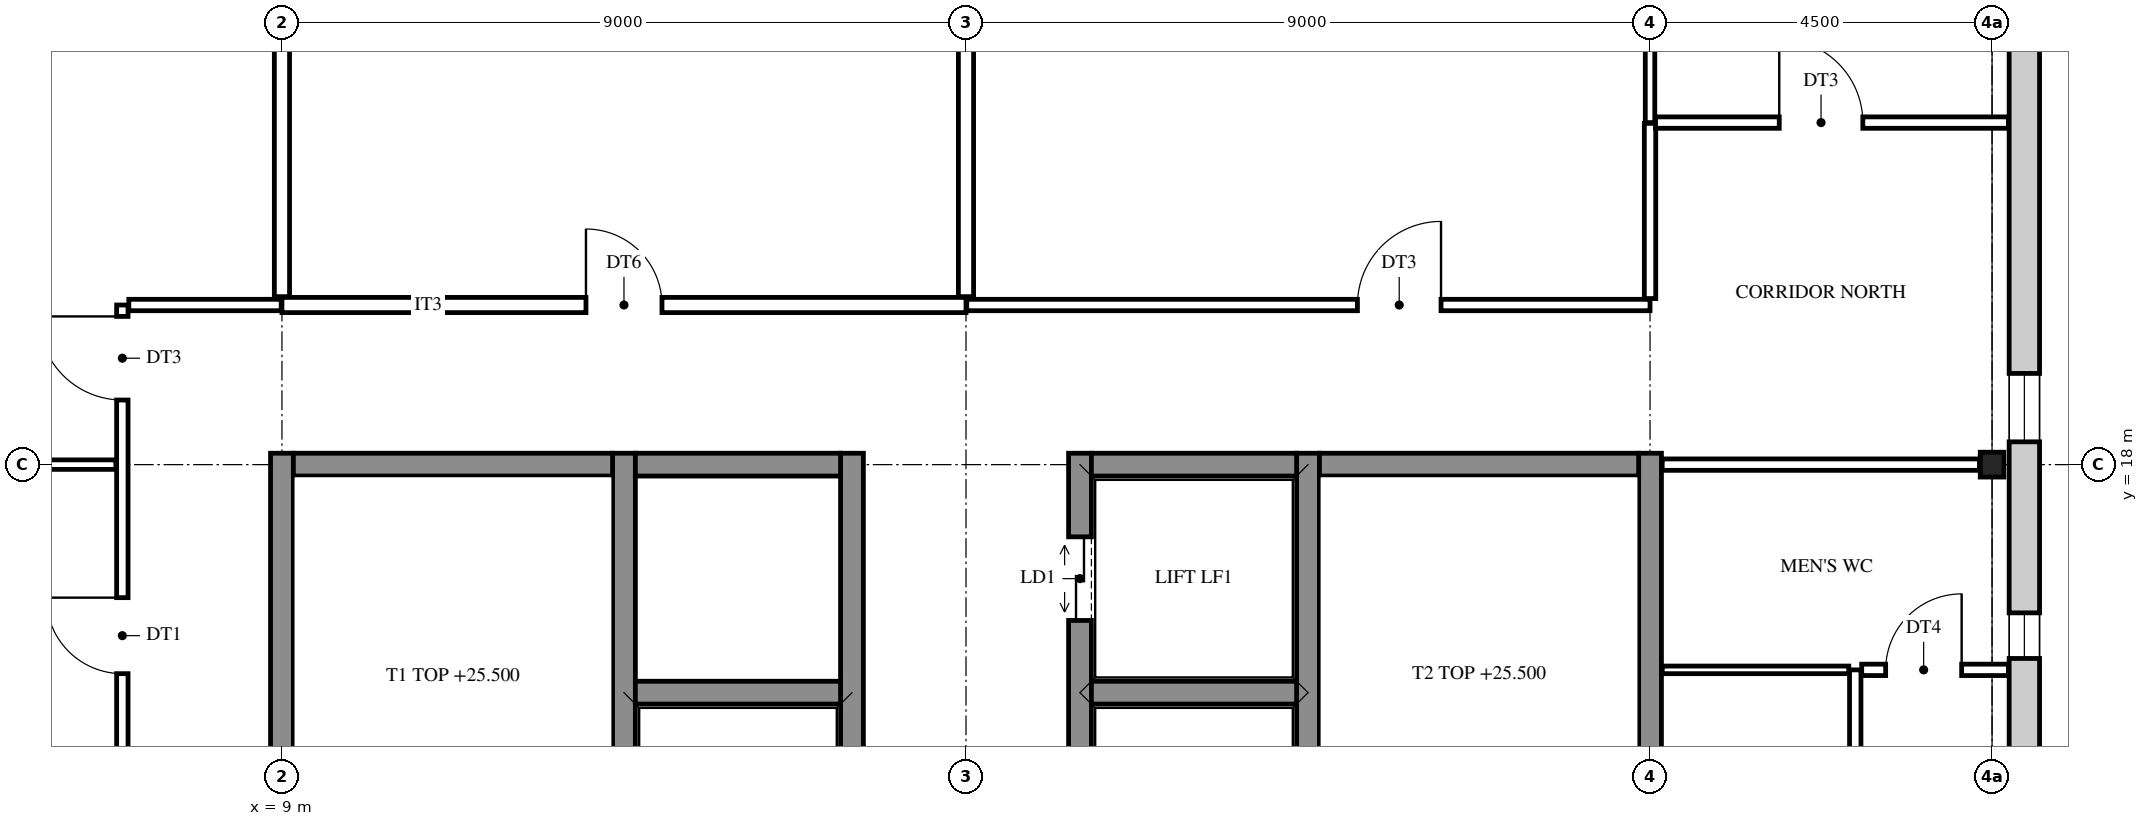
"""IFC4 building model, lengths in metres.
Left out: names, types, materials, properties, quantities, classifications, styles, units other than length and angle.
Written with IfcOpenShell. Run it as: python <this file> out.ifc"""

import sys

from ifc_helpers import new_model, si_unit, direction, frame, frame_2d, origin, origin_2d, place, context, subcontext, project, spatial, rectangle, i_section, extrude, element, fill, save


model = new_model("IFC4")
c1 = context("Model", 3, precision=1e-05, world=origin(), true_north=direction((0.0, 1.0)))
c2 = subcontext(c1, "Body", "Model", "MODEL_VIEW")
j1 = project(units=[si_unit("LENGTHUNIT", "METRE"), si_unit("PLANEANGLEUNIT", "RADIAN")], contexts=[c1])
p1 = place(None, origin())
s1 = spatial("IfcSite", under=j1, at=p1, CompositionType="ELEMENT")
p2 = place(p1, origin())
s2 = spatial("IfcBuilding", under=s1, at=p2, CompositionType="ELEMENT")
p3 = place(p2, frame((0.0, 0.0, 23.4)))
s3 = spatial("IfcBuildingStorey", under=s2, at=p3, CompositionType="ELEMENT", Elevation=23.4)
p4 = place(p3, frame((31.5, 18.0, 0.0), z_axis=(0.0, 0.0, 1.0), x_axis=(1.0, 0.0, 0.0)))
e1 = element("IfcColumn", 1, at=p4, inside=s3, PredefinedType="COLUMN", context=c2, shape_type="SweptSolid", body=[
    extrude(i_section(OverallWidth=0.311, OverallDepth=0.327, WebThickness=0.016, FlangeThickness=0.025, FilletRadius=0.017, at=origin_2d()), origin(), (0.0, 0.0, 1.0), 4.2),
])
for number, where, z_axis, x_axis in (
    (2, (9.0, 8.85, 0.0), (0.0, 0.0, 1.0), (0.0, 1.0, 0.0)),
    (3, (13.5, 8.85, 0.0), (0.0, 0.0, 1.0), (0.0, 1.0, 0.0)),
):
    element("IfcWall", number, at=place(p3, frame(where, z_axis=z_axis, x_axis=x_axis)), inside=s3, PredefinedType="SHEAR", context=c2, shape_type="SweptSolid", body=[
        extrude(rectangle(XDim=9.3, YDim=0.3, at=frame_2d((4.65, 0.0))), origin(), (0.0, 0.0, 1.0), 4.2),
    ])
p5 = place(p3, frame((16.5, 8.85, 0.0), z_axis=(0.0, 0.0, 1.0), x_axis=(0.0, 1.0, 0.0)))
e4 = element("IfcWall", 4, at=p5, inside=s3, PredefinedType="SHEAR", context=c2, shape_type="SweptSolid", body=[
    extrude(rectangle(XDim=9.3, YDim=0.3, at=frame_2d((4.65, 0.0))), origin(), (0.0, 0.0, 1.0), 4.2),
])
p6 = place(p5, frame((1.1, 0.0, 0.0)))
e5 = element("IfcOpeningElement", 5, at=p6, cuts=e4, PredefinedType="OPENING", context=c2, shape_type="SweptSolid", body=[
    extrude(rectangle(XDim=1.1, YDim=2.1, at=frame_2d((0.55, 1.05))), frame((0.0, 0.16, 0.0), z_axis=(0.0, -1.0, 0.0), x_axis=(1.0, 0.0, 0.0)), (0.0, 0.0, 1.0), 0.32),
])
p7 = place(p5, frame((4.1, 0.0, 0.0)))
e6 = element("IfcOpeningElement", 6, at=p7, cuts=e4, PredefinedType="OPENING", context=c2, shape_type="SweptSolid", body=[
    extrude(rectangle(XDim=1.1, YDim=2.1, at=frame_2d((0.55, 1.05))), frame((0.0, 0.16, 0.0), z_axis=(0.0, -1.0, 0.0), x_axis=(1.0, 0.0, 0.0)), (0.0, 0.0, 1.0), 0.32),
])
p8 = place(p3, frame((19.5, 8.85, 0.0), z_axis=(0.0, 0.0, 1.0), x_axis=(0.0, 1.0, 0.0)))
e7 = element("IfcWall", 7, at=p8, inside=s3, PredefinedType="SHEAR", context=c2, shape_type="SweptSolid", body=[
    extrude(rectangle(XDim=9.3, YDim=0.3, at=frame_2d((4.65, 0.0))), origin(), (0.0, 0.0, 1.0), 4.2),
])
p9 = place(p8, frame((3.95, 0.0, 0.0)))
e8 = element("IfcOpeningElement", 8, at=p9, cuts=e7, PredefinedType="OPENING", context=c2, shape_type="SweptSolid", body=[
    extrude(rectangle(XDim=1.4, YDim=2.1, at=frame_2d((0.7, 1.05))), frame((0.0, 0.16, 0.0), z_axis=(0.0, -1.0, 0.0), x_axis=(1.0, 0.0, 0.0)), (0.0, 0.0, 1.0), 0.32),
])
p10 = place(p8, frame((7.1, 0.0, 0.0)))
e9 = element("IfcOpeningElement", 9, at=p10, cuts=e7, PredefinedType="OPENING", context=c2, shape_type="SweptSolid", body=[
    extrude(rectangle(XDim=1.1, YDim=2.1, at=frame_2d((0.55, 1.05))), frame((0.0, 0.16, 0.0), z_axis=(0.0, -1.0, 0.0), x_axis=(1.0, 0.0, 0.0)), (0.0, 0.0, 1.0), 0.32),
])
for number, where, z_axis, x_axis in (
    (10, (22.5, 8.85, 0.0), (0.0, 0.0, 1.0), (0.0, 1.0, 0.0)),
    (11, (27.0, 8.85, 0.0), (0.0, 0.0, 1.0), (0.0, 1.0, 0.0)),
):
    element("IfcWall", number, at=place(p3, frame(where, z_axis=z_axis, x_axis=x_axis)), inside=s3, PredefinedType="SHEAR", context=c2, shape_type="SweptSolid", body=[
        extrude(rectangle(XDim=9.3, YDim=0.3, at=frame_2d((4.65, 0.0))), origin(), (0.0, 0.0, 1.0), 4.2),
    ])
for number, where, z_axis, x_axis in (
    (12, (13.65, 15.0, 0.0), (0.0, 0.0, 1.0), (1.0, 0.0, 0.0)),
    (13, (19.65, 15.0, 0.0), (0.0, 0.0, 1.0), (1.0, 0.0, 0.0)),
):
    element("IfcWall", number, at=place(p3, frame(where, z_axis=z_axis, x_axis=x_axis)), inside=s3, PredefinedType="SHEAR", context=c2, shape_type="SweptSolid", body=[
        extrude(rectangle(XDim=2.7, YDim=0.3, at=frame_2d((1.35, 0.0))), origin(), (0.0, 0.0, 1.0), 4.2),
    ])
p11 = place(p3, frame((9.15, 18.0, 0.0), z_axis=(0.0, 0.0, 1.0), x_axis=(1.0, 0.0, 0.0)))
e14 = element("IfcWall", 14, at=p11, inside=s3, PredefinedType="SHEAR", context=c2, shape_type="SweptSolid", body=[
    extrude(rectangle(XDim=4.2, YDim=0.3, at=frame_2d((2.1, 0.0))), origin(), (0.0, 0.0, 1.0), 4.2),
])
for number, where, z_axis, x_axis in (
    (15, (13.65, 18.0, 0.0), (0.0, 0.0, 1.0), (1.0, 0.0, 0.0)),
    (16, (19.65, 18.0, 0.0), (0.0, 0.0, 1.0), (1.0, 0.0, 0.0)),
):
    element("IfcWall", number, at=place(p3, frame(where, z_axis=z_axis, x_axis=x_axis)), inside=s3, PredefinedType="SHEAR", context=c2, shape_type="SweptSolid", body=[
        extrude(rectangle(XDim=2.7, YDim=0.3, at=frame_2d((1.35, 0.0))), origin(), (0.0, 0.0, 1.0), 4.2),
    ])
p12 = place(p3, frame((22.65, 18.0, 0.0), z_axis=(0.0, 0.0, 1.0), x_axis=(1.0, 0.0, 0.0)))
e17 = element("IfcWall", 17, at=p12, inside=s3, PredefinedType="SHEAR", context=c2, shape_type="SweptSolid", body=[
    extrude(rectangle(XDim=4.2, YDim=0.3, at=frame_2d((2.1, 0.0))), origin(), (0.0, 0.0, 1.0), 4.2),
])
p13 = place(p3, frame((31.925, 27.225, 0.0), z_axis=(0.0, 0.0, 1.0), x_axis=(0.0, -1.0, 0.0)))
e18 = element("IfcWall", 18, at=p13, inside=s3, PredefinedType="STANDARD", context=c2, shape_type="SweptSolid", body=[
    extrude(rectangle(XDim=27.45, YDim=0.4, at=frame_2d((13.725, 0.0))), origin(), (0.0, 0.0, 1.0), 4.2),
])
p14 = place(p13, frame((26.025, 0.0, 0.9)))
e19 = element("IfcOpeningElement", 19, at=p14, cuts=e18, PredefinedType="OPENING", context=c2, shape_type="SweptSolid", body=[
    extrude(rectangle(XDim=0.9, YDim=2.0, at=frame_2d((0.45, 1.0))), frame((0.0, 0.21, 0.0), z_axis=(0.0, -1.0, 0.0), x_axis=(1.0, 0.0, 0.0)), (0.0, 0.0, 1.0), 0.42),
])
p15 = place(p13, frame((18.525, 0.0, 0.9)))
e20 = element("IfcOpeningElement", 20, at=p15, cuts=e18, PredefinedType="OPENING", context=c2, shape_type="SweptSolid", body=[
    extrude(rectangle(XDim=0.9, YDim=2.0, at=frame_2d((0.45, 1.0))), frame((0.0, 0.21, 0.0), z_axis=(0.0, -1.0, 0.0), x_axis=(1.0, 0.0, 0.0)), (0.0, 0.0, 1.0), 0.42),
])
p16 = place(p13, frame((15.675, 0.0, 1.6)))
e21 = element("IfcOpeningElement", 21, at=p16, cuts=e18, PredefinedType="OPENING", context=c2, shape_type="SweptSolid", body=[
    extrude(rectangle(XDim=0.6, YDim=0.9, at=frame_2d((0.3, 0.45))), frame((0.0, 0.21, 0.0), z_axis=(0.0, -1.0, 0.0), x_axis=(1.0, 0.0, 0.0)), (0.0, 0.0, 1.0), 0.42),
])
p17 = place(p13, frame((11.175, 0.0, 1.6)))
e22 = element("IfcOpeningElement", 22, at=p17, cuts=e18, PredefinedType="OPENING", context=c2, shape_type="SweptSolid", body=[
    extrude(rectangle(XDim=0.6, YDim=0.9, at=frame_2d((0.3, 0.45))), frame((0.0, 0.21, 0.0), z_axis=(0.0, -1.0, 0.0), x_axis=(1.0, 0.0, 0.0)), (0.0, 0.0, 1.0), 0.42),
])
p18 = place(p13, frame((8.025, 0.0, 0.9)))
e23 = element("IfcOpeningElement", 23, at=p18, cuts=e18, PredefinedType="OPENING", context=c2, shape_type="SweptSolid", body=[
    extrude(rectangle(XDim=0.9, YDim=2.0, at=frame_2d((0.45, 1.0))), frame((0.0, 0.21, 0.0), z_axis=(0.0, -1.0, 0.0), x_axis=(1.0, 0.0, 0.0)), (0.0, 0.0, 1.0), 0.42),
])
p19 = place(p13, frame((0.525, 0.0, 0.9)))
e24 = element("IfcOpeningElement", 24, at=p19, cuts=e18, PredefinedType="OPENING", context=c2, shape_type="SweptSolid", body=[
    extrude(rectangle(XDim=0.9, YDim=2.0, at=frame_2d((0.45, 1.0))), frame((0.0, 0.21, 0.0), z_axis=(0.0, -1.0, 0.0), x_axis=(1.0, 0.0, 0.0)), (0.0, 0.0, 1.0), 0.42),
])
p20 = place(p3, frame((6.9, 6.985, 0.0), z_axis=(0.0, 0.0, 1.0), x_axis=(0.0, 1.0, 0.0)))
e25 = element("IfcWall", 25, at=p20, inside=s3, PredefinedType="PARTITIONING", context=c2, shape_type="SweptSolid", body=[
    extrude(rectangle(XDim=13.115, YDim=0.15, at=frame_2d((6.558, 0.0))), origin(), (0.0, 0.0, 1.0), 3.537),
])
p21 = place(p20, frame((11.865, 0.0, 0.0)))
e26 = element("IfcOpeningElement", 26, at=p21, cuts=e25, PredefinedType="OPENING", context=c2, shape_type="SweptSolid", body=[
    extrude(rectangle(XDim=1.1, YDim=2.1, at=frame_2d((0.55, 1.05))), frame((0.0, 0.085, 0.0), z_axis=(0.0, -1.0, 0.0), x_axis=(1.0, 0.0, 0.0)), (0.0, 0.0, 1.0), 0.17),
])
p22 = place(p20, frame((3.765, 0.0, 0.0)))
e27 = element("IfcOpeningElement", 27, at=p22, cuts=e25, PredefinedType="OPENING", context=c2, shape_type="SweptSolid", body=[
    extrude(rectangle(XDim=1.0, YDim=2.1, at=frame_2d((0.5, 1.05))), frame((0.0, 0.085, 0.0), z_axis=(0.0, -1.0, 0.0), x_axis=(1.0, 0.0, 0.0)), (0.0, 0.0, 1.0), 0.17),
])
p23 = place(p20, frame((8.265, 0.0, 0.0)))
e28 = element("IfcOpeningElement", 28, at=p23, cuts=e25, PredefinedType="OPENING", context=c2, shape_type="SweptSolid", body=[
    extrude(rectangle(XDim=1.0, YDim=2.1, at=frame_2d((0.5, 1.05))), frame((0.0, 0.085, 0.0), z_axis=(0.0, -1.0, 0.0), x_axis=(1.0, 0.0, 0.0)), (0.0, 0.0, 1.0), 0.17),
])
for number, where, z_axis, x_axis in (
    (29, (9.0, 20.21, 0.0), (0.0, 0.0, 1.0), (0.0, 1.0, 0.0)),
    (30, (18.0, 20.21, 0.0), (0.0, 0.0, 1.0), (0.0, 1.0, 0.0)),
):
    element("IfcWall", number, at=place(p3, frame(where, z_axis=z_axis, x_axis=x_axis)), inside=s3, PredefinedType="PARTITIONING", context=c2, shape_type="SweptSolid", body=[
        extrude(rectangle(XDim=6.616, YDim=0.2, at=frame_2d((3.308, 0.0))), origin(), (0.0, 0.0, 1.0), 3.537),
    ])
p24 = place(p3, frame((27.0, 20.185, 0.0), z_axis=(0.0, 0.0, 1.0), x_axis=(0.0, 1.0, 0.0)))
e31 = element("IfcWall", 31, at=p24, inside=s3, PredefinedType="PARTITIONING", context=c2, shape_type="SweptSolid", body=[
    extrude(rectangle(XDim=2.305, YDim=0.15, at=frame_2d((1.152, 0.0))), origin(), (0.0, 0.0, 1.0), 3.537),
])
p25 = place(p3, frame((27.0, 22.5, 0.0), z_axis=(0.0, 0.0, 1.0), x_axis=(0.0, 1.0, 0.0)))
e32 = element("IfcWall", 32, at=p25, inside=s3, PredefinedType="PARTITIONING", context=c2, shape_type="SweptSolid", body=[
    extrude(rectangle(XDim=4.326, YDim=0.125, at=frame_2d((2.163, 0.0))), origin(), (0.0, 0.0, 1.0), 3.537),
])
p26 = place(p3, frame((29.7, 9.0, 0.0), z_axis=(0.0, 0.0, 1.0), x_axis=(0.0, 1.0, 0.0)))
e33 = element("IfcWall", 33, at=p26, inside=s3, PredefinedType="PARTITIONING", context=c2, shape_type="SweptSolid", body=[
    extrude(rectangle(XDim=6.3, YDim=0.15, at=frame_2d((3.15, 0.0))), origin(), (0.0, 0.0, 1.0), 3.537),
])
p27 = place(p26, frame((4.0, 0.0, 0.0)))
e34 = element("IfcOpeningElement", 34, at=p27, cuts=e33, PredefinedType="OPENING", context=c2, shape_type="SweptSolid", body=[
    extrude(rectangle(XDim=1.0, YDim=2.1, at=frame_2d((0.5, 1.05))), frame((0.0, 0.085, 0.0), z_axis=(0.0, -1.0, 0.0), x_axis=(1.0, 0.0, 0.0)), (0.0, 0.0, 1.0), 0.17),
])
p28 = place(p3, frame((27.16, 15.3, 0.0), z_axis=(0.0, 0.0, 1.0), x_axis=(1.0, 0.0, 0.0)))
e35 = element("IfcWall", 35, at=p28, inside=s3, PredefinedType="PARTITIONING", context=c2, shape_type="SweptSolid", body=[
    extrude(rectangle(XDim=2.455, YDim=0.1, at=frame_2d((1.228, 0.0))), origin(), (0.0, 0.0, 1.0), 3.537),
])
p29 = place(p3, frame((29.785, 15.3, 0.0), z_axis=(0.0, 0.0, 1.0), x_axis=(1.0, 0.0, 0.0)))
e36 = element("IfcWall", 36, at=p29, inside=s3, PredefinedType="PARTITIONING", context=c2, shape_type="SweptSolid", body=[
    extrude(rectangle(XDim=1.93, YDim=0.15, at=frame_2d((0.965, 0.0))), origin(), (0.0, 0.0, 1.0), 3.537),
])
p30 = place(p29, frame((0.315, 0.0, 0.0)))
e37 = element("IfcOpeningElement", 37, at=p30, cuts=e36, PredefinedType="OPENING", context=c2, shape_type="SweptSolid", body=[
    extrude(rectangle(XDim=1.0, YDim=2.1, at=frame_2d((0.5, 1.05))), frame((0.0, 0.085, 0.0), z_axis=(0.0, -1.0, 0.0), x_axis=(1.0, 0.0, 0.0)), (0.0, 0.0, 1.0), 0.17),
])
p31 = place(p3, frame((0.166, 18.0, 0.0), z_axis=(0.0, 0.0, 1.0), x_axis=(1.0, 0.0, 0.0)))
e38 = element("IfcWall", 38, at=p31, inside=s3, PredefinedType="PARTITIONING", context=c2, shape_type="SweptSolid", body=[
    extrude(rectangle(XDim=6.649, YDim=0.125, at=frame_2d((3.325, 0.0))), origin(), (0.0, 0.0, 1.0), 3.537),
])
p32 = place(p3, frame((27.16, 18.0, 0.0), z_axis=(0.0, 0.0, 1.0), x_axis=(1.0, 0.0, 0.0)))
e39 = element("IfcWall", 39, at=p32, inside=s3, PredefinedType="PARTITIONING", context=c2, shape_type="SweptSolid", body=[
    extrude(rectangle(XDim=4.175, YDim=0.15, at=frame_2d((2.087, 0.0))), origin(), (0.0, 0.0, 1.0), 3.537),
])
p33 = place(p3, frame((6.985, 20.1, 0.0), z_axis=(0.0, 0.0, 1.0), x_axis=(1.0, 0.0, 0.0)))
e40 = element("IfcWall", 40, at=p33, inside=s3, PredefinedType="PARTITIONING", context=c2, shape_type="SweptSolid", body=[
    extrude(rectangle(XDim=2.005, YDim=0.15, at=frame_2d((1.002, 0.0))), origin(), (0.0, 0.0, 1.0), 3.537),
])
p34 = place(p3, frame((9.0, 20.1, 0.0), z_axis=(0.0, 0.0, 1.0), x_axis=(1.0, 0.0, 0.0)))
e41 = element("IfcWall", 41, at=p34, inside=s3, PredefinedType="PARTITIONING", context=c2, shape_type="SweptSolid", body=[
    extrude(rectangle(XDim=9.0, YDim=0.2, at=frame_2d((4.5, 0.0))), origin(), (0.0, 0.0, 1.0), 3.537),
])
p35 = place(p34, frame((4.0, 0.0, 0.0)))
e42 = element("IfcOpeningElement", 42, at=p35, cuts=e41, PredefinedType="OPENING", context=c2, shape_type="SweptSolid", body=[
    extrude(rectangle(XDim=1.0, YDim=2.1, at=frame_2d((0.5, 1.05))), frame((0.0, 0.11, 0.0), z_axis=(0.0, -1.0, 0.0), x_axis=(1.0, 0.0, 0.0)), (0.0, 0.0, 1.0), 0.22),
])
p36 = place(p3, frame((18.01, 20.1, 0.0), z_axis=(0.0, 0.0, 1.0), x_axis=(1.0, 0.0, 0.0)))
e43 = element("IfcWall", 43, at=p36, inside=s3, PredefinedType="PARTITIONING", context=c2, shape_type="SweptSolid", body=[
    extrude(rectangle(XDim=8.99, YDim=0.15, at=frame_2d((4.495, 0.0))), origin(), (0.0, 0.0, 1.0), 3.537),
])
p37 = place(p36, frame((5.14, 0.0, 0.0)))
e44 = element("IfcOpeningElement", 44, at=p37, cuts=e43, PredefinedType="OPENING", context=c2, shape_type="SweptSolid", body=[
    extrude(rectangle(XDim=1.1, YDim=2.1, at=frame_2d((0.55, 1.05))), frame((0.0, 0.085, 0.0), z_axis=(0.0, -1.0, 0.0), x_axis=(1.0, 0.0, 0.0)), (0.0, 0.0, 1.0), 0.17),
])
p38 = place(p3, frame((27.073, 22.5, 0.0), z_axis=(0.0, 0.0, 1.0), x_axis=(1.0, 0.0, 0.0)))
e45 = element("IfcWall", 45, at=p38, inside=s3, PredefinedType="PARTITIONING", context=c2, shape_type="SweptSolid", body=[
    extrude(rectangle(XDim=4.643, YDim=0.15, at=frame_2d((2.321, 0.0))), origin(), (0.0, 0.0, 1.0), 3.537),
])
p39 = place(p38, frame((1.627, 0.0, 0.0)))
e46 = element("IfcOpeningElement", 46, at=p39, cuts=e45, PredefinedType="OPENING", context=c2, shape_type="SweptSolid", body=[
    extrude(rectangle(XDim=1.1, YDim=2.1, at=frame_2d((0.55, 1.05))), frame((0.0, 0.085, 0.0), z_axis=(0.0, -1.0, 0.0), x_axis=(1.0, 0.0, 0.0)), (0.0, 0.0, 1.0), 0.17),
])
p40 = place(p17, origin())
e47 = element("IfcWindow", 47, at=p40, inside=s3, PartitioningType="SINGLE_PANEL", PredefinedType="WINDOW", context=c2, shape_type="SweptSolid", body=[
    extrude(rectangle(XDim=0.6, YDim=0.9, at=frame_2d((0.3, 0.45))), frame((0.0, 0.03, 0.0), z_axis=(0.0, -1.0, 0.0), x_axis=(1.0, 0.0, 0.0)), (0.0, 0.0, 1.0), 0.06),
])
fill(e22, e47)
p41 = place(p18, origin())
e48 = element("IfcWindow", 48, at=p41, inside=s3, PartitioningType="SINGLE_PANEL", PredefinedType="WINDOW", context=c2, shape_type="SweptSolid", body=[
    extrude(rectangle(XDim=0.9, YDim=2.0, at=frame_2d((0.45, 1.0))), frame((0.0, 0.03, 0.0), z_axis=(0.0, -1.0, 0.0), x_axis=(1.0, 0.0, 0.0)), (0.0, 0.0, 1.0), 0.06),
])
fill(e23, e48)
p42 = place(p30, origin())
e49 = element("IfcDoor", 49, at=p42, inside=s3, OperationType="SINGLE_SWING_RIGHT", PredefinedType="DOOR", context=c2, shape_type="SweptSolid", body=[
    extrude(rectangle(XDim=1.0, YDim=2.1, at=frame_2d((0.5, 1.05))), frame((0.0, 0.025, 0.0), z_axis=(0.0, -1.0, 0.0), x_axis=(1.0, 0.0, 0.0)), (0.0, 0.0, 1.0), 0.05),
])
fill(e37, e49)
p43 = place(p21, origin())
e50 = element("IfcDoor", 50, at=p43, inside=s3, OperationType="SINGLE_SWING_RIGHT", PredefinedType="DOOR", context=c2, shape_type="SweptSolid", body=[
    extrude(rectangle(XDim=1.1, YDim=2.1, at=frame_2d((0.55, 1.05))), frame((0.0, 0.025, 0.0), z_axis=(0.0, -1.0, 0.0), x_axis=(1.0, 0.0, 0.0)), (0.0, 0.0, 1.0), 0.05),
])
fill(e26, e50)
p44 = place(p35, origin())
e51 = element("IfcDoor", 51, at=p44, inside=s3, OperationType="SINGLE_SWING_LEFT", PredefinedType="DOOR", context=c2, shape_type="SweptSolid", body=[
    extrude(rectangle(XDim=1.0, YDim=2.1, at=frame_2d((0.5, 1.05))), frame((0.0, 0.025, 0.0), z_axis=(0.0, -1.0, 0.0), x_axis=(1.0, 0.0, 0.0)), (0.0, 0.0, 1.0), 0.05),
])
fill(e42, e51)
p45 = place(p37, origin())
e52 = element("IfcDoor", 52, at=p45, inside=s3, OperationType="SINGLE_SWING_RIGHT", PredefinedType="DOOR", context=c2, shape_type="SweptSolid", body=[
    extrude(rectangle(XDim=1.1, YDim=2.1, at=frame_2d((0.55, 1.05))), frame((0.0, 0.025, 0.0), z_axis=(0.0, -1.0, 0.0), x_axis=(1.0, 0.0, 0.0)), (0.0, 0.0, 1.0), 0.05),
])
fill(e44, e52)
p46 = place(p23, origin())
e53 = element("IfcDoor", 53, at=p46, inside=s3, OperationType="SINGLE_SWING_RIGHT", PredefinedType="DOOR", context=c2, shape_type="SweptSolid", body=[
    extrude(rectangle(XDim=1.0, YDim=2.1, at=frame_2d((0.5, 1.05))), frame((0.0, 0.025, 0.0), z_axis=(0.0, -1.0, 0.0), x_axis=(1.0, 0.0, 0.0)), (0.0, 0.0, 1.0), 0.05),
])
fill(e28, e53)
p47 = place(p39, origin())
e54 = element("IfcDoor", 54, at=p47, inside=s3, OperationType="SINGLE_SWING_LEFT", PredefinedType="DOOR", context=c2, shape_type="SweptSolid", body=[
    extrude(rectangle(XDim=1.1, YDim=2.1, at=frame_2d((0.55, 1.05))), frame((0.0, 0.025, 0.0), z_axis=(0.0, -1.0, 0.0), x_axis=(1.0, 0.0, 0.0)), (0.0, 0.0, 1.0), 0.05),
])
fill(e46, e54)
p48 = place(p10, origin())
e55 = element("IfcDoor", 55, at=p48, inside=s3, OperationType="DOUBLE_DOOR_SLIDING", PredefinedType="DOOR", context=c2, shape_type="SweptSolid", body=[
    extrude(rectangle(XDim=1.1, YDim=2.1, at=frame_2d((0.55, 1.05))), frame((0.0, 0.025, 0.0), z_axis=(0.0, -1.0, 0.0), x_axis=(1.0, 0.0, 0.0)), (0.0, 0.0, 1.0), 0.05),
])
fill(e9, e55)
save(model, sys.argv[1])
